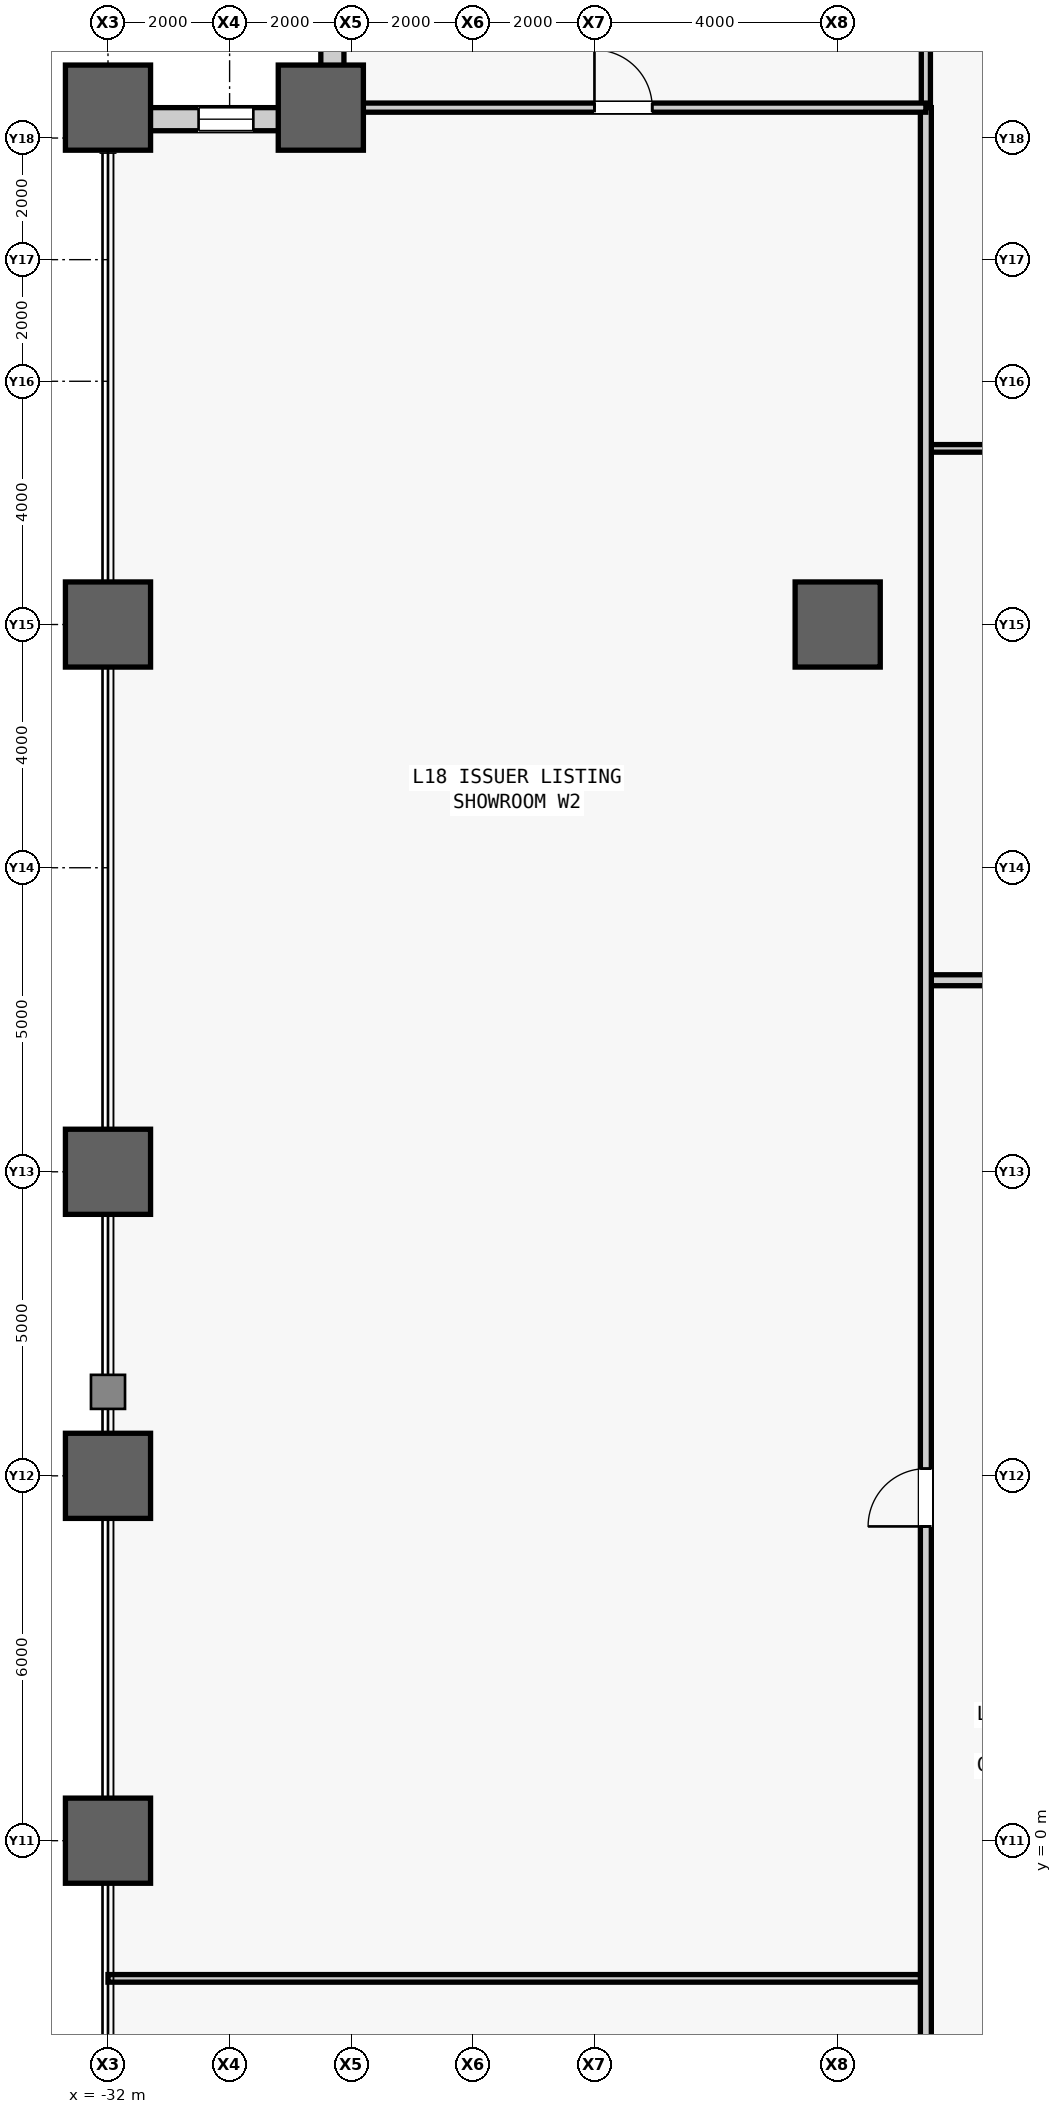
"""IFC4 building model, lengths in metres.
Left out: names, types, materials, properties, quantities, classifications, styles, units other than length and angle.
Written with IfcOpenShell. Run it as: python <this file> out.ifc"""

import sys

from ifc_helpers import new_model, si_unit, direction, frame, frame_2d, origin, origin_2d, place, context, subcontext, project, spatial, rectangle, hollow_rectangle, extrude, source, transform, mapped, element, fill, save


model = new_model("IFC4")
c1 = context("Model", 3, precision=1e-05, world=origin(), true_north=direction((0.0, 1.0)))
c2 = subcontext(c1, "Body", "Model", "MODEL_VIEW")
j1 = project(units=[si_unit("LENGTHUNIT", "METRE"), si_unit("PLANEANGLEUNIT", "RADIAN")], contexts=[c1])
p1 = place(None, origin())
s1 = spatial("IfcSite", under=j1, at=p1, CompositionType="ELEMENT")
p2 = place(p1, origin())
s2 = spatial("IfcBuilding", under=s1, at=p2, CompositionType="ELEMENT")
p3 = place(p2, frame((0.0, 0.0, 83.0)))
s3 = spatial("IfcBuildingStorey", under=s2, at=p3, CompositionType="ELEMENT", Elevation=83.0)
m1 = source(origin(), c2, "Body", "SweptSolid", [
    extrude(hollow_rectangle(XDim=1.4, YDim=1.4, WallThickness=0.075, at=origin_2d()), origin(), (0.0, 0.0, 1.0), 4.2),
])
for number, where, z_axis, x_axis in (
    (1, (-32.0, 0.0, 0.0), (0.0, 0.0, 1.0), (1.0, 0.0, 0.0)),
    (2, (-32.0, 6.0, 0.0), (0.0, 0.0, 1.0), (1.0, 0.0, 0.0)),
    (3, (-32.0, 11.0, 0.0), (0.0, 0.0, 1.0), (1.0, 0.0, 0.0)),
    (4, (-32.0, 20.0, 0.0), (0.0, 0.0, 1.0), (1.0, 0.0, 0.0)),
    (5, (-32.0, 28.5, 0.0), (0.0, 0.0, 1.0), (1.0, 0.0, 0.0)),
    (6, (-28.5, 28.5, 0.0), (0.0, 0.0, 1.0), (1.0, 0.0, 0.0)),
    (7, (-20.0, 20.0, 0.0), (0.0, 0.0, 1.0), (1.0, 0.0, 0.0)),
):
    element("IfcColumn", number, at=place(p3, frame(where, z_axis=z_axis, x_axis=x_axis)), inside=s3, PredefinedType="COLUMN", context=c2, shape_type="MappedRepresentation", body=[
        mapped(m1, transform((0.0, 0.0, 0.0), scale=1.0)),
    ])
m2 = source(origin(), c2, "Body", "SweptSolid", [
    extrude(rectangle(XDim=3.12, YDim=0.38, at=frame_2d((1.56, 0.0))), origin(), (0.0, 0.0, 1.0), 3.245),
])
p4 = place(p3, frame((-28.31, 28.5, 0.0), z_axis=(0.0, 0.0, 1.0), x_axis=(0.0, 1.0, 0.0)))
e8 = element("IfcWall", 8, at=p4, inside=s3, PredefinedType="STANDARD", context=c2, shape_type="MappedRepresentation", body=[
    mapped(m2, transform((0.0, 0.0, 0.0), scale=1.0)),
])
m3 = source(origin(), c2, "Body", "SweptSolid", [
    extrude(rectangle(XDim=0.9, YDim=2.4, at=frame_2d((0.45, 1.2))), frame((0.0, 0.2, 0.0), z_axis=(0.0, -1.0, 0.0), x_axis=(1.0, 0.0, 0.0)), (0.0, 0.0, 1.0), 0.4),
])
p5 = place(p4, frame((1.11, 0.0, 0.5)))
e9 = element("IfcOpeningElement", 9, at=p5, cuts=e8, PredefinedType="OPENING", context=c2, shape_type="MappedRepresentation", body=[
    mapped(m3, transform((0.0, 0.0, 0.0), scale=1.0)),
])
p6 = place(p3, frame((-28.5, 28.31, 0.0), z_axis=(0.0, 0.0, 1.0), x_axis=(-1.0, 0.0, 0.0)))
e10 = element("IfcWall", 10, at=p6, inside=s3, PredefinedType="STANDARD", context=c2, shape_type="MappedRepresentation", body=[
    mapped(m2, transform((0.0, 0.0, 0.0), scale=1.0)),
])
p7 = place(p6, frame((1.11, 0.0, 0.5)))
e11 = element("IfcOpeningElement", 11, at=p7, cuts=e10, PredefinedType="OPENING", context=c2, shape_type="MappedRepresentation", body=[
    mapped(m3, transform((0.0, 0.0, 0.0), scale=1.0)),
])
m4 = source(origin(), c2, "Body", "SweptSolid", [
    extrude(rectangle(XDim=11.385, YDim=0.125, at=frame_2d((5.692, 0.0))), origin(), (0.0, 0.0, 1.0), 3.94),
])
p8 = place(p3, frame((-18.55, 22.896, 0.0), z_axis=(0.0, 0.0, 1.0), x_axis=(1.0, 0.0, 0.0)))
e12 = element("IfcWall", 12, at=p8, inside=s3, PredefinedType="PARTITIONING", context=c2, shape_type="MappedRepresentation", body=[
    mapped(m4, transform((0.0, 0.0, 0.0), scale=1.0)),
])
m5 = source(origin(), c2, "Body", "SweptSolid", [
    extrude(rectangle(XDim=0.95, YDim=2.15, at=frame_2d((0.475, 1.075))), frame((0.0, 0.073, 0.0), z_axis=(0.0, -1.0, 0.0), x_axis=(1.0, 0.0, 0.0)), (0.0, 0.0, 1.0), 0.145),
])
p9 = place(p8, frame((5.218, 0.0, 0.0)))
e13 = element("IfcOpeningElement", 13, at=p9, cuts=e12, PredefinedType="OPENING", context=c2, shape_type="MappedRepresentation", body=[
    mapped(m5, transform((0.0, 0.0, 0.0), scale=1.0)),
])
m6 = source(origin(), c2, "Body", "SweptSolid", [
    extrude(rectangle(XDim=37.95, YDim=0.18, at=frame_2d((18.975, 0.0))), origin(), (0.0, 0.0, 1.0), 3.94),
])
p10 = place(p3, frame((-18.55, 14.15, 0.0), z_axis=(0.0, 0.0, 1.0), x_axis=(1.0, 0.0, 0.0)))
e14 = element("IfcWall", 14, at=p10, inside=s3, PredefinedType="PARTITIONING", context=c2, shape_type="MappedRepresentation", body=[
    mapped(m6, transform((0.0, 0.0, 0.0), scale=1.0)),
])
m7 = source(origin(), c2, "Body", "SweptSolid", [
    extrude(rectangle(XDim=1.05, YDim=2.2, at=frame_2d((0.525, 1.1))), frame((0.0, 0.1, 0.0), z_axis=(0.0, -1.0, 0.0), x_axis=(1.0, 0.0, 0.0)), (0.0, 0.0, 1.0), 0.2),
])
p11 = place(p10, frame((7.242, 0.0, 0.0)))
e15 = element("IfcOpeningElement", 15, at=p11, cuts=e14, PredefinedType="OPENING", context=c2, shape_type="MappedRepresentation", body=[
    mapped(m7, transform((0.0, 0.0, 0.0), scale=1.0)),
])
p12 = place(p10, frame((17.691, 0.0, 0.0)))
e16 = element("IfcOpeningElement", 16, at=p12, cuts=e14, PredefinedType="OPENING", context=c2, shape_type="MappedRepresentation", body=[
    mapped(m7, transform((0.0, 0.0, 0.0), scale=1.0)),
])
p13 = place(p10, frame((28.473, 0.0, 0.0)))
e17 = element("IfcOpeningElement", 17, at=p13, cuts=e14, PredefinedType="OPENING", context=c2, shape_type="MappedRepresentation", body=[
    mapped(m7, transform((0.0, 0.0, 0.0), scale=1.0)),
])
m8 = source(origin(), c2, "Body", "SweptSolid", [
    extrude(rectangle(XDim=3.5, YDim=0.15, at=frame_2d((1.75, 0.0))), origin(), (0.0, 0.0, 1.0), 3.94),
])
p14 = place(p3, frame((-18.55, 28.5, 0.0), z_axis=(0.0, 0.0, 1.0), x_axis=(0.0, 1.0, 0.0)))
e18 = element("IfcWall", 18, at=p14, inside=s3, PredefinedType="PARTITIONING", context=c2, shape_type="MappedRepresentation", body=[
    mapped(m8, transform((0.0, 0.0, 0.0), scale=1.0)),
])
m9 = source(origin(), c2, "Body", "SweptSolid", [
    extrude(rectangle(XDim=13.45, YDim=0.125, at=frame_2d((6.725, 0.0))), origin(), (0.0, 0.0, 1.0), 3.94),
])
p15 = place(p3, frame((-32.0, -2.264, 0.0), z_axis=(0.0, 0.0, 1.0), x_axis=(1.0, 0.0, 0.0)))
e19 = element("IfcWall", 19, at=p15, inside=s3, PredefinedType="PARTITIONING", context=c2, shape_type="MappedRepresentation", body=[
    mapped(m9, transform((0.0, 0.0, 0.0), scale=1.0)),
])
m10 = source(origin(), c2, "Body", "SweptSolid", [
    extrude(rectangle(XDim=57.0, YDim=0.18, at=frame_2d((28.5, 0.0))), origin(), (0.0, 0.0, 1.0), 3.94),
])
p16 = place(p3, frame((-18.55, -28.5, 0.0), z_axis=(0.0, 0.0, 1.0), x_axis=(0.0, 1.0, 0.0)))
e20 = element("IfcWall", 20, at=p16, inside=s3, PredefinedType="PARTITIONING", context=c2, shape_type="MappedRepresentation", body=[
    mapped(m10, transform((0.0, 0.0, 0.0), scale=1.0)),
])
m11 = source(origin(), c2, "Body", "SweptSolid", [
    extrude(rectangle(XDim=0.95, YDim=2.15, at=frame_2d((0.475, 1.075))), frame((0.0, 0.1, 0.0), z_axis=(0.0, -1.0, 0.0), x_axis=(1.0, 0.0, 0.0)), (0.0, 0.0, 1.0), 0.2),
])
p17 = place(p16, frame((20.118, 0.0, 0.0)))
e21 = element("IfcOpeningElement", 21, at=p17, cuts=e20, PredefinedType="OPENING", context=c2, shape_type="MappedRepresentation", body=[
    mapped(m11, transform((0.0, 0.0, 0.0), scale=1.0)),
])
p18 = place(p16, frame((33.668, 0.0, 0.0)))
e22 = element("IfcOpeningElement", 22, at=p18, cuts=e20, PredefinedType="OPENING", context=c2, shape_type="MappedRepresentation", body=[
    mapped(m11, transform((0.0, 0.0, 0.0), scale=1.0)),
])
m12 = source(origin(), c2, "Body", "SweptSolid", [
    extrude(rectangle(XDim=9.95, YDim=0.15, at=frame_2d((4.975, 0.0))), origin(), (0.0, 0.0, 1.0), 3.94),
])
p19 = place(p3, frame((-28.5, 28.5, 0.0), z_axis=(0.0, 0.0, 1.0), x_axis=(1.0, 0.0, 0.0)))
e23 = element("IfcWall", 23, at=p19, inside=s3, PredefinedType="PARTITIONING", context=c2, shape_type="MappedRepresentation", body=[
    mapped(m12, transform((0.0, 0.0, 0.0), scale=1.0)),
])
m13 = source(origin(), c2, "Body", "SweptSolid", [
    extrude(rectangle(XDim=0.95, YDim=2.15, at=frame_2d((0.475, 1.075))), frame((0.0, 0.085, 0.0), z_axis=(0.0, -1.0, 0.0), x_axis=(1.0, 0.0, 0.0)), (0.0, 0.0, 1.0), 0.17),
])
p20 = place(p19, frame((4.5, 0.0, 0.0)))
e24 = element("IfcOpeningElement", 24, at=p20, cuts=e23, PredefinedType="OPENING", context=c2, shape_type="MappedRepresentation", body=[
    mapped(m13, transform((0.0, 0.0, 0.0), scale=1.0)),
])
m14 = source(origin(), c2, "Body", "SweptSolid", [
    extrude(rectangle(XDim=0.9, YDim=2.4, at=frame_2d((0.45, 1.2))), frame((0.0, 0.03, 0.0), z_axis=(0.0, -1.0, 0.0), x_axis=(1.0, 0.0, 0.0)), (0.0, 0.0, 1.0), 0.06),
])
p21 = place(p7, origin())
e25 = element("IfcWindow", 25, at=p21, inside=s3, PartitioningType="SINGLE_PANEL", PredefinedType="WINDOW", context=c2, shape_type="MappedRepresentation", body=[
    mapped(m14, transform((0.0, 0.0, 0.0), scale=1.0)),
])
fill(e11, e25)
m15 = source(origin(), c2, "Body", "SweptSolid", [
    extrude(rectangle(XDim=0.95, YDim=2.15, at=frame_2d((0.475, 1.075))), frame((0.0, 0.025, 0.0), z_axis=(0.0, -1.0, 0.0), x_axis=(1.0, 0.0, 0.0)), (0.0, 0.0, 1.0), 0.05),
])
p22 = place(p18, origin())
e26 = element("IfcDoor", 26, at=p22, inside=s3, OperationType="SINGLE_SWING_LEFT", PredefinedType="DOOR", context=c2, shape_type="MappedRepresentation", body=[
    mapped(m15, transform((0.0, 0.0, 0.0), scale=1.0)),
])
fill(e22, e26)
p23 = place(p20, origin())
e27 = element("IfcDoor", 27, at=p23, inside=s3, OperationType="SINGLE_SWING_LEFT", PredefinedType="DOOR", context=c2, shape_type="MappedRepresentation", body=[
    mapped(m15, transform((0.0, 0.0, 0.0), scale=1.0)),
])
fill(e24, e27)
save(model, sys.argv[1])
